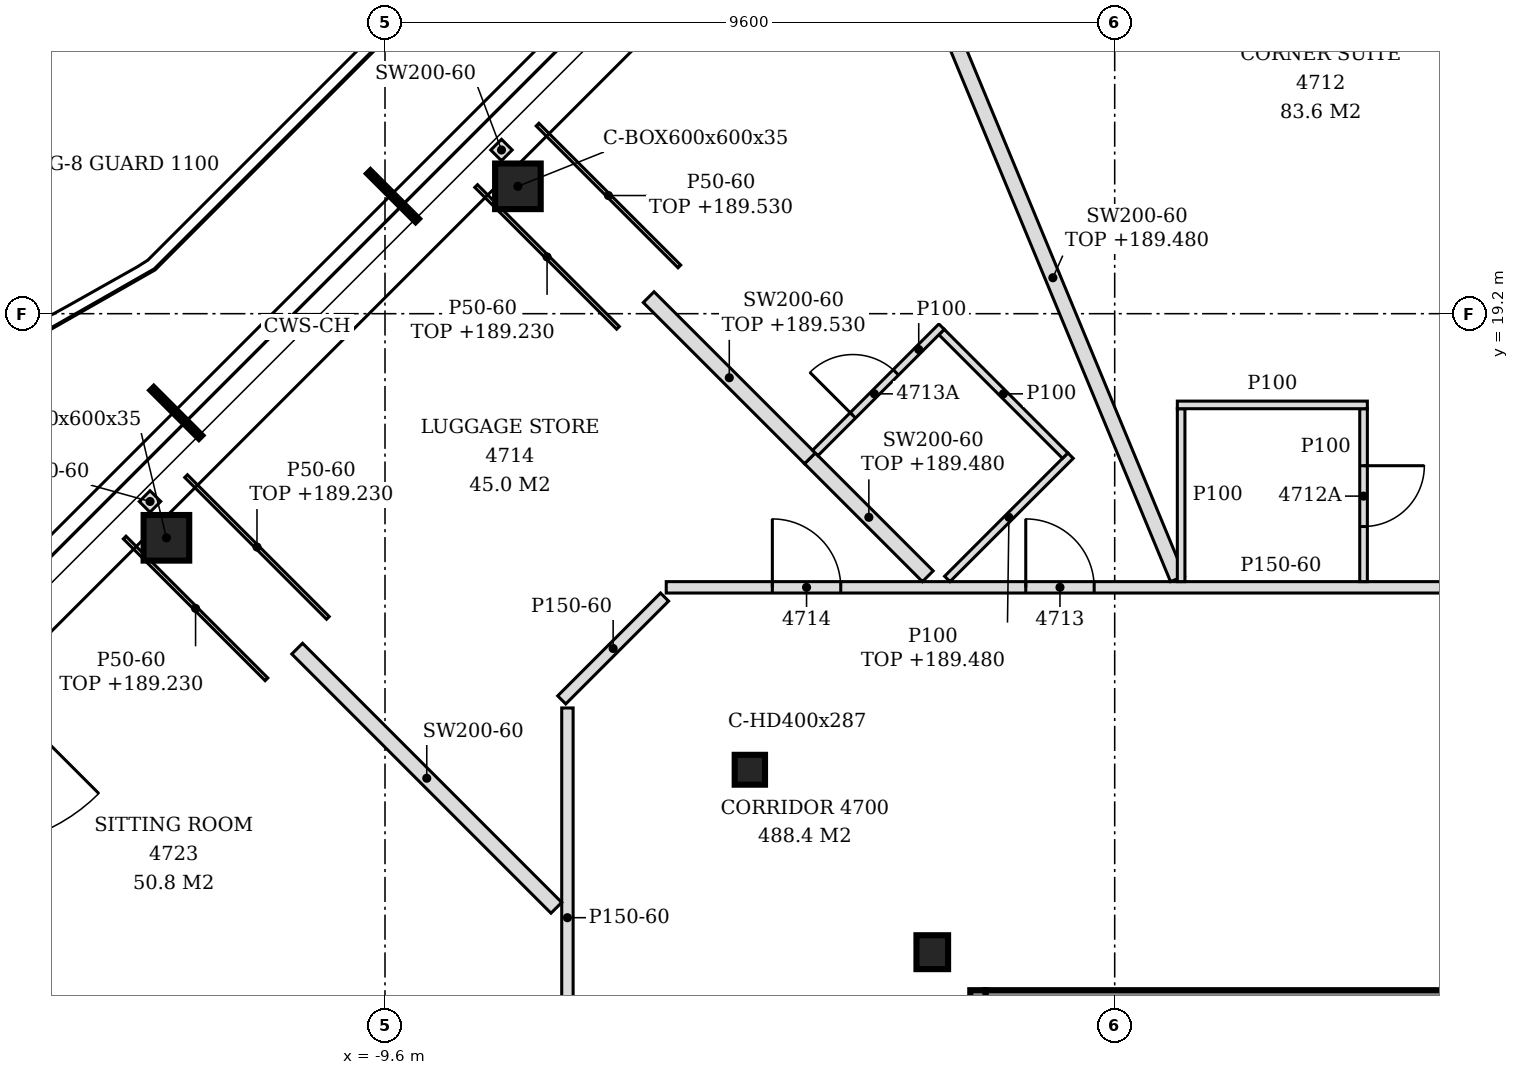
"""IFC4 building model, lengths in metres.
Left out: names, types, materials, properties, quantities, classifications, styles, units other than length and angle.
Written with IfcOpenShell. Run it as: python <this file> out.ifc"""

import sys

from ifc_helpers import new_model, si_unit, direction, frame, frame_2d, origin, origin_2d, place, context, subcontext, project, spatial, polyline, rectangle, hollow_rectangle, i_section, outline, extrude, clip, halfspace, element, fill, save


model = new_model("IFC4")
c1 = context("Model", 3, precision=1e-05, world=origin(), true_north=direction((0.0, 1.0)))
c2 = subcontext(c1, "Body", "Model", "MODEL_VIEW")
j1 = project(units=[si_unit("LENGTHUNIT", "METRE"), si_unit("PLANEANGLEUNIT", "RADIAN")], contexts=[c1])
p1 = place(None, origin())
s1 = spatial("IfcSite", under=j1, at=p1, CompositionType="ELEMENT")
p2 = place(p1, origin())
s2 = spatial("IfcBuilding", under=s1, at=p2, CompositionType="ELEMENT")
p3 = place(p2, frame((0.0, 0.0, 186.6)))
s3 = spatial("IfcBuildingStorey", under=s2, at=p3, CompositionType="ELEMENT", Elevation=186.6)
for number, where, z_axis, x_axis in (
    (1, (-7.852, 20.876, -0.15), (0.387, -0.258, 0.885), (0.555, 0.832, 0.0)),
    (2, (-12.476, 16.251, -0.15), (0.387, -0.258, 0.885), (0.555, 0.832, 0.0)),
):
    element("IfcColumn", number, at=place(p3, frame(where, z_axis=z_axis, x_axis=x_axis)), inside=s3, PredefinedType="COLUMN", context=c2, shape_type="Clipping", body=[
        clip(extrude(hollow_rectangle(XDim=0.6, YDim=0.6, WallThickness=0.035, at=origin_2d()), origin(), (0.0, 0.0, 1.0), 4.067), halfspace(frame((0.0, 0.0, 4.049), z_axis=(0.0, 0.0, 1.0), x_axis=(1.0, 0.0, 0.0)), False)),
    ])
p4 = place(p3, frame((-4.8, 13.2, -0.15), z_axis=(0.0, 0.0, 1.0), x_axis=(1.0, 0.0, 0.0)))
e3 = element("IfcColumn", 3, at=p4, inside=s3, PredefinedType="COLUMN", context=c2, shape_type="SweptSolid", body=[
    extrude(i_section(OverallWidth=0.399, OverallDepth=0.393, WebThickness=0.023, FlangeThickness=0.037, FilletRadius=0.015, at=origin_2d()), origin(), (0.0, 0.0, 1.0), 3.6),
])
p5 = place(p3, frame((-2.4, 10.8, -0.15), z_axis=(0.0, 0.0, 1.0), x_axis=(1.0, 0.0, 0.0)))
e4 = element("IfcColumn", 4, at=p5, inside=s3, PredefinedType="COLUMN", context=c2, shape_type="SweptSolid", body=[
    extrude(i_section(OverallWidth=0.416, OverallDepth=0.446, WebThickness=0.039, FlangeThickness=0.063, FilletRadius=0.015, at=origin_2d()), origin(), (0.0, 0.0, 1.0), 3.6),
])
p6 = place(p3, frame((-1.7, 10.2, 0.0), z_axis=(0.0, 0.0, 1.0), x_axis=(1.0, 0.0, 0.0)))
e5 = element("IfcWall", 5, at=p6, inside=s3, PredefinedType="SOLIDWALL", context=c2, shape_type="SweptSolid", body=[
    extrude(rectangle(XDim=7.9, YDim=0.2, at=frame_2d((3.95, 0.0))), origin(), (0.0, 0.0, 1.0), 3.45),
])
p7 = place(p3, frame((-1.8, -5.5, 0.0), z_axis=(0.0, 0.0, 1.0), x_axis=(0.0, 1.0, 0.0)))
e6 = element("IfcWall", 6, at=p7, inside=s3, PredefinedType="SOLIDWALL", context=c2, shape_type="SweptSolid", body=[
    extrude(rectangle(XDim=15.8, YDim=0.2, at=frame_2d((7.9, 0.0))), origin(), (0.0, 0.0, 1.0), 3.45),
])
p8 = place(p7, frame((3.05, 0.0, 0.0)))
e7 = element("IfcOpeningElement", 7, at=p8, cuts=e6, PredefinedType="OPENING", context=c2, shape_type="SweptSolid", body=[
    extrude(rectangle(XDim=1.3, YDim=2.1, at=frame_2d((0.65, 1.05))), frame((0.0, 0.11, 0.0), z_axis=(0.0, -1.0, 0.0), x_axis=(1.0, 0.0, 0.0)), (0.0, 0.0, 1.0), 0.22),
])
p9 = place(p7, frame((11.45, 0.0, 0.0)))
e8 = element("IfcOpeningElement", 8, at=p9, cuts=e6, PredefinedType="OPENING", context=c2, shape_type="SweptSolid", body=[
    extrude(rectangle(XDim=1.3, YDim=2.1, at=frame_2d((0.65, 1.05))), frame((0.0, 0.11, 0.0), z_axis=(0.0, -1.0, 0.0), x_axis=(1.0, 0.0, 0.0)), (0.0, 0.0, 1.0), 0.22),
])
p10 = place(p3, frame((-7.2, -9.5, 0.0), z_axis=(0.0, 0.0, 1.0), x_axis=(0.0, 1.0, 0.0)))
e9 = element("IfcWall", 9, at=p10, inside=s3, PredefinedType="PARTITIONING", context=c2, shape_type="SweptSolid", body=[
    extrude(outline(polyline([(0.0, 0.0), (23.513, 0.0), (23.513, 3.45), (20.55, 3.45), (20.548, 2.93), (20.35, 2.93), (20.348, 3.45), (15.75, 3.45), (15.748, 2.93), (15.55, 2.93), (15.548, 3.45), (10.95, 3.45), (10.948, 2.93), (10.75, 2.93), (10.748, 3.45), (6.15, 3.45), (6.148, 2.93), (5.95, 2.93), (5.948, 3.45), (1.35, 3.45), (1.348, 2.93), (1.15, 2.93), (1.148, 3.45), (0.0, 3.45), (0.0, 0.0)])), frame((0.0, 0.075, 0.0), z_axis=(0.0, -1.0, 0.0), x_axis=(1.0, 0.0, 0.0)), (0.0, 0.0, 1.0), 0.15),
])
p11 = place(p10, frame((17.095, 0.0, 0.0)))
e10 = element("IfcOpeningElement", 10, at=p11, cuts=e9, PredefinedType="OPENING", context=c2, shape_type="SweptSolid", body=[
    extrude(rectangle(XDim=0.9, YDim=2.1, at=frame_2d((0.45, 1.05))), frame((0.0, 0.085, 0.0), z_axis=(0.0, -1.0, 0.0), x_axis=(1.0, 0.0, 0.0)), (0.0, 0.0, 1.0), 0.17),
])
p12 = place(p10, frame((13.494, 0.0, 0.0)))
e11 = element("IfcOpeningElement", 11, at=p12, cuts=e9, PredefinedType="OPENING", context=c2, shape_type="SweptSolid", body=[
    extrude(rectangle(XDim=0.9, YDim=2.1, at=frame_2d((0.45, 1.05))), frame((0.0, 0.085, 0.0), z_axis=(0.0, -1.0, 0.0), x_axis=(1.0, 0.0, 0.0)), (0.0, 0.0, 1.0), 0.17),
])
p13 = place(p10, frame((7.68, 0.0, 0.0)))
e12 = element("IfcOpeningElement", 12, at=p13, cuts=e9, PredefinedType="OPENING", context=c2, shape_type="SweptSolid", body=[
    extrude(rectangle(XDim=0.9, YDim=2.1, at=frame_2d((0.45, 1.05))), frame((0.0, 0.085, 0.0), z_axis=(0.0, -1.0, 0.0), x_axis=(1.0, 0.0, 0.0)), (0.0, 0.0, 1.0), 0.17),
])
p14 = place(p10, frame((5.137, 0.0, 0.0)))
e13 = element("IfcOpeningElement", 13, at=p14, cuts=e9, PredefinedType="OPENING", context=c2, shape_type="SweptSolid", body=[
    extrude(rectangle(XDim=0.9, YDim=2.1, at=frame_2d((0.45, 1.05))), frame((0.0, 0.085, 0.0), z_axis=(0.0, -1.0, 0.0), x_axis=(1.0, 0.0, 0.0)), (0.0, 0.0, 1.0), 0.17),
])
p15 = place(p3, frame((-7.346, 11.384, 0.0), z_axis=(0.0, 0.0, 1.0), x_axis=(-0.707132095121, 0.707081466346, 0.0)))
e14 = element("IfcWall", 14, at=p15, inside=s3, PredefinedType="PARTITIONING", context=c2, shape_type="SweptSolid", body=[
    extrude(rectangle(XDim=4.822, YDim=0.2, at=frame_2d((2.411, 0.0))), origin(), (0.0, 0.0, 1.0), 3.45),
])
p16 = place(p3, frame((-7.275, 14.119, 0.0), z_axis=(0.0, 0.0, 1.0), x_axis=(0.707042977282, 0.707170579335, 0.0)))
e15 = element("IfcWall", 15, at=p16, inside=s3, PredefinedType="PARTITIONING", context=c2, shape_type="SweptSolid", body=[
    extrude(rectangle(XDim=1.913, YDim=0.15, at=frame_2d((0.957, 0.0))), origin(), (0.0, 0.0, 1.0), 3.45),
])
p17 = place(p3, frame((-5.9, 15.6, 0.0), z_axis=(0.0, 0.0, 1.0), x_axis=(1.0, 0.0, 0.0)))
e16 = element("IfcWall", 16, at=p17, inside=s3, PredefinedType="PARTITIONING", context=c2, shape_type="SweptSolid", body=[
    extrude(outline(polyline([(0.0, 0.0), (26.2, 0.0), (26.2, 2.88), (25.25, 2.88), (25.248, 2.83), (24.95, 2.83), (24.948, 2.88), (13.25, 2.88), (13.248, 2.83), (12.95, 2.83), (12.948, 2.88), (1.25, 2.88), (1.248, 2.93), (0.95, 2.93), (0.948, 3.45), (0.0, 3.45), (0.0, 0.0)])), frame((0.0, 0.075, 0.0), z_axis=(0.0, -1.0, 0.0), x_axis=(1.0, 0.0, 0.0)), (0.0, 0.0, 1.0), 0.15),
])
p18 = place(p17, frame((23.678, 0.0, 0.0)))
e17 = element("IfcOpeningElement", 17, at=p18, cuts=e16, PredefinedType="OPENING", context=c2, shape_type="SweptSolid", body=[
    extrude(rectangle(XDim=0.9, YDim=2.1, at=frame_2d((0.45, 1.05))), frame((0.0, 0.085, 0.0), z_axis=(0.0, -1.0, 0.0), x_axis=(1.0, 0.0, 0.0)), (0.0, 0.0, 1.0), 0.17),
])
p19 = place(p17, frame((19.796, 0.0, 0.0)))
e18 = element("IfcOpeningElement", 18, at=p19, cuts=e16, PredefinedType="OPENING", context=c2, shape_type="SweptSolid", body=[
    extrude(rectangle(XDim=0.9, YDim=2.1, at=frame_2d((0.45, 1.05))), frame((0.0, 0.085, 0.0), z_axis=(0.0, -1.0, 0.0), x_axis=(1.0, 0.0, 0.0)), (0.0, 0.0, 1.0), 0.17),
])
p20 = place(p17, frame((15.121, 0.0, 0.0)))
e19 = element("IfcOpeningElement", 19, at=p20, cuts=e16, PredefinedType="OPENING", context=c2, shape_type="SweptSolid", body=[
    extrude(rectangle(XDim=0.9, YDim=2.1, at=frame_2d((0.45, 1.05))), frame((0.0, 0.085, 0.0), z_axis=(0.0, -1.0, 0.0), x_axis=(1.0, 0.0, 0.0)), (0.0, 0.0, 1.0), 0.17),
])
p21 = place(p17, frame((10.543, 0.0, 0.0)))
e20 = element("IfcOpeningElement", 20, at=p21, cuts=e16, PredefinedType="OPENING", context=c2, shape_type="SweptSolid", body=[
    extrude(rectangle(XDim=0.9, YDim=2.1, at=frame_2d((0.45, 1.05))), frame((0.0, 0.085, 0.0), z_axis=(0.0, -1.0, 0.0), x_axis=(1.0, 0.0, 0.0)), (0.0, 0.0, 1.0), 0.17),
])
p22 = place(p17, frame((4.73, 0.0, 0.0)))
e21 = element("IfcOpeningElement", 21, at=p22, cuts=e16, PredefinedType="OPENING", context=c2, shape_type="SweptSolid", body=[
    extrude(rectangle(XDim=0.9, YDim=2.1, at=frame_2d((0.45, 1.05))), frame((0.0, 0.085, 0.0), z_axis=(0.0, -1.0, 0.0), x_axis=(1.0, 0.0, 0.0)), (0.0, 0.0, 1.0), 0.17),
])
p23 = place(p17, frame((1.396, 0.0, 0.0)))
e22 = element("IfcOpeningElement", 22, at=p23, cuts=e16, PredefinedType="OPENING", context=c2, shape_type="SweptSolid", body=[
    extrude(rectangle(XDim=0.9, YDim=2.1, at=frame_2d((0.45, 1.05))), frame((0.0, 0.085, 0.0), z_axis=(0.0, -1.0, 0.0), x_axis=(1.0, 0.0, 0.0)), (0.0, 0.0, 1.0), 0.17),
])
p24 = place(p3, frame((-2.459, 15.746, 0.0), z_axis=(0.0, 0.0, 1.0), x_axis=(-0.707051140727, 0.707162417268, 0.0)))
e23 = element("IfcWall", 23, at=p24, inside=s3, PredefinedType="PARTITIONING", context=c2, shape_type="SweptSolid", body=[
    extrude(rectangle(XDim=2.194, YDim=0.2, at=frame_2d((1.097, 0.0))), origin(), (0.0, 0.0, 1.0), 2.88),
])
p25 = place(p3, frame((-2.203, 15.71, 0.0), z_axis=(0.0, 0.0, 1.0), x_axis=(0.707106781187, 0.707106781187, 0.0)))
e24 = element("IfcWall", 24, at=p25, inside=s3, PredefinedType="PARTITIONING", context=c2, shape_type="SweptSolid", body=[
    extrude(rectangle(XDim=2.294, YDim=0.1, at=frame_2d((1.147, 0.0))), origin(), (0.0, 0.0, 1.0), 2.88),
])
p26 = place(p3, frame((0.827, 15.713, 0.0), z_axis=(0.0, 0.0, 1.0), x_axis=(-0.382735813185, 0.923857833925, 0.0)))
e25 = element("IfcWall", 25, at=p26, inside=s3, PredefinedType="PARTITIONING", context=c2, shape_type="SweptSolid", body=[
    extrude(rectangle(XDim=8.572, YDim=0.2, at=frame_2d((4.286, 0.0))), origin(), (0.0, 0.0, 1.0), 2.88),
])
p27 = place(p3, frame((0.874, 15.675, 0.0), z_axis=(0.0, 0.0, 1.0), x_axis=(0.0, 1.0, 0.0)))
e26 = element("IfcWall", 26, at=p27, inside=s3, PredefinedType="PARTITIONING", context=c2, shape_type="SweptSolid", body=[
    extrude(outline(polyline([(0.0, 0.0), (2.275, 0.0), (2.275, 3.45), (0.18, 3.45), (0.178, 2.88), (0.0, 2.88), (0.0, 0.0)])), frame((0.0, 0.05, 0.0), z_axis=(0.0, -1.0, 0.0), x_axis=(1.0, 0.0, 0.0)), (0.0, 0.0, 1.0), 0.1),
])
p28 = place(p3, frame((3.274, 15.675, 0.0), z_axis=(0.0, 0.0, 1.0), x_axis=(0.0, 1.0, 0.0)))
e27 = element("IfcWall", 27, at=p28, inside=s3, PredefinedType="PARTITIONING", context=c2, shape_type="SweptSolid", body=[
    extrude(outline(polyline([(0.0, 0.0), (2.275, 0.0), (2.275, 3.45), (0.18, 3.45), (0.178, 2.88), (0.0, 2.88), (0.0, 0.0)])), frame((0.0, 0.05, 0.0), z_axis=(0.0, -1.0, 0.0), x_axis=(1.0, 0.0, 0.0)), (0.0, 0.0, 1.0), 0.1),
])
p29 = place(p28, frame((0.725, 0.0, 0.0)))
e28 = element("IfcOpeningElement", 28, at=p29, cuts=e27, PredefinedType="OPENING", context=c2, shape_type="SweptSolid", body=[
    extrude(rectangle(XDim=0.8, YDim=2.1, at=frame_2d((0.4, 1.05))), frame((0.0, 0.06, 0.0), z_axis=(0.0, -1.0, 0.0), x_axis=(1.0, 0.0, 0.0)), (0.0, 0.0, 1.0), 0.12),
])
p30 = place(p3, frame((-12.621, 16.659, 0.0), z_axis=(0.0, 0.0, 1.0), x_axis=(-0.707106781187, 0.707106781187, 0.0)))
e29 = element("IfcWall", 29, at=p30, inside=s3, PredefinedType="PARTITIONING", context=c2, shape_type="SweptSolid", body=[
    extrude(rectangle(XDim=0.199, YDim=0.2, at=frame_2d((0.1, 0.0))), origin(), (0.0, 0.0, 1.0), 3.45),
])
p31 = place(p3, frame((-4.01, 17.297, 0.0), z_axis=(0.0, 0.0, 1.0), x_axis=(-0.707188174772, 0.707025378231, 0.0)))
e30 = element("IfcWall", 30, at=p31, inside=s3, PredefinedType="PARTITIONING", context=c2, shape_type="SweptSolid", body=[
    extrude(rectangle(XDim=2.999, YDim=0.2, at=frame_2d((1.5, 0.0))), origin(), (0.0, 0.0, 1.0), 2.93),
])
p32 = place(p3, frame((-0.651, 17.333, 0.0), z_axis=(0.0, 0.0, 1.0), x_axis=(-0.707159861304, 0.707053697085, 0.0)))
e31 = element("IfcWall", 31, at=p32, inside=s3, PredefinedType="PARTITIONING", context=c2, shape_type="SweptSolid", body=[
    extrude(rectangle(XDim=2.3, YDim=0.1, at=frame_2d((1.15, 0.0))), origin(), (0.0, 0.0, 1.0), 3.45),
])
p33 = place(p3, frame((-3.939, 17.368, 0.0), z_axis=(0.0, 0.0, 1.0), x_axis=(0.707106781187, 0.707106781187, 0.0)))
e32 = element("IfcWall", 32, at=p33, inside=s3, PredefinedType="PARTITIONING", context=c2, shape_type="SweptSolid", body=[
    extrude(rectangle(XDim=2.35, YDim=0.1, at=frame_2d((1.175, 0.0))), origin(), (0.0, 0.0, 1.0), 3.45),
])
p34 = place(p33, frame((0.7, 0.0, 0.0)))
e33 = element("IfcOpeningElement", 33, at=p34, cuts=e32, PredefinedType="OPENING", context=c2, shape_type="SweptSolid", body=[
    extrude(rectangle(XDim=0.8, YDim=2.1, at=frame_2d((0.4, 1.05))), frame((0.0, 0.06, 0.0), z_axis=(0.0, -1.0, 0.0), x_axis=(1.0, 0.0, 0.0)), (0.0, 0.0, 1.0), 0.12),
])
p35 = place(p3, frame((0.824, 18.0, 0.0), z_axis=(0.0, 0.0, 1.0), x_axis=(1.0, 0.0, 0.0)))
e34 = element("IfcWall", 34, at=p35, inside=s3, PredefinedType="PARTITIONING", context=c2, shape_type="SweptSolid", body=[
    extrude(rectangle(XDim=2.5, YDim=0.1, at=frame_2d((1.25, 0.0))), origin(), (0.0, 0.0, 1.0), 3.45),
])
p36 = place(p3, frame((-7.997, 21.283, 0.0), z_axis=(0.0, 0.0, 1.0), x_axis=(-0.706492173294, 0.707720855334, 0.0)))
e35 = element("IfcWall", 35, at=p36, inside=s3, PredefinedType="PARTITIONING", context=c2, shape_type="SweptSolid", body=[
    extrude(rectangle(XDim=0.199, YDim=0.2, at=frame_2d((0.099, 0.0))), origin(), (0.0, 0.0, 1.0), 3.45),
])
for number, where, z_axis, x_axis in (
    (36, (-11.159, 14.39, 0.0), (0.0, 0.0, 1.0), (-0.707, 0.707, 0.0)),
    (37, (-10.351, 15.198, 0.0), (0.0, 0.0, 1.0), (-0.707, 0.707, 0.0)),
    (38, (-6.535, 19.014, 0.0), (0.0, 0.0, 1.0), (-0.707, 0.707, 0.0)),
):
    element("IfcWall", number, at=place(p3, frame(where, z_axis=z_axis, x_axis=x_axis)), inside=s3, PredefinedType="PARTITIONING", context=c2, shape_type="SweptSolid", body=[
        extrude(rectangle(XDim=2.638, YDim=0.05, at=frame_2d((1.319, 0.0))), origin(), (0.0, 0.0, 1.0), 2.63),
    ])
p37 = place(p3, frame((-5.727, 19.822, 0.0), z_axis=(0.0, 0.0, 1.0), x_axis=(-0.707199304153, 0.707014246112, 0.0)))
e39 = element("IfcWall", 39, at=p37, inside=s3, PredefinedType="PARTITIONING", context=c2, shape_type="SweptSolid", body=[
    extrude(rectangle(XDim=2.638, YDim=0.05, at=frame_2d((1.319, 0.0))), origin(), (0.0, 0.0, 1.0), 2.93),
])
p38 = place(p29, frame((0.8, 0.0, 0.0), z_axis=(0.0, 0.0, 1.0), x_axis=(-1.0, 0.0, 0.0)))
e40 = element("IfcDoor", 40, at=p38, inside=s3, OperationType="SINGLE_SWING_LEFT", PredefinedType="DOOR", context=c2, shape_type="SweptSolid", body=[
    extrude(rectangle(XDim=0.8, YDim=2.1, at=frame_2d((0.4, 1.05))), frame((0.0, 0.025, 0.0), z_axis=(0.0, -1.0, 0.0), x_axis=(1.0, 0.0, 0.0)), (0.0, 0.0, 1.0), 0.05),
])
fill(e28, e40)
p39 = place(p22, origin())
e41 = element("IfcDoor", 41, at=p39, inside=s3, OperationType="SINGLE_SWING_LEFT", PredefinedType="DOOR", context=c2, shape_type="SweptSolid", body=[
    extrude(rectangle(XDim=0.9, YDim=2.1, at=frame_2d((0.45, 1.05))), frame((0.0, 0.025, 0.0), z_axis=(0.0, -1.0, 0.0), x_axis=(1.0, 0.0, 0.0)), (0.0, 0.0, 1.0), 0.05),
])
fill(e21, e41)
p40 = place(p34, origin())
e42 = element("IfcDoor", 42, at=p40, inside=s3, OperationType="SINGLE_SWING_LEFT", PredefinedType="DOOR", context=c2, shape_type="SweptSolid", body=[
    extrude(rectangle(XDim=0.8, YDim=2.1, at=frame_2d((0.4, 1.05))), frame((0.0, 0.025, 0.0), z_axis=(0.0, -1.0, 0.0), x_axis=(1.0, 0.0, 0.0)), (0.0, 0.0, 1.0), 0.05),
])
fill(e33, e42)
p41 = place(p23, origin())
e43 = element("IfcDoor", 43, at=p41, inside=s3, OperationType="SINGLE_SWING_LEFT", PredefinedType="DOOR", context=c2, shape_type="SweptSolid", body=[
    extrude(rectangle(XDim=0.9, YDim=2.1, at=frame_2d((0.45, 1.05))), frame((0.0, 0.025, 0.0), z_axis=(0.0, -1.0, 0.0), x_axis=(1.0, 0.0, 0.0)), (0.0, 0.0, 1.0), 0.05),
])
fill(e22, e43)
save(model, sys.argv[1])
